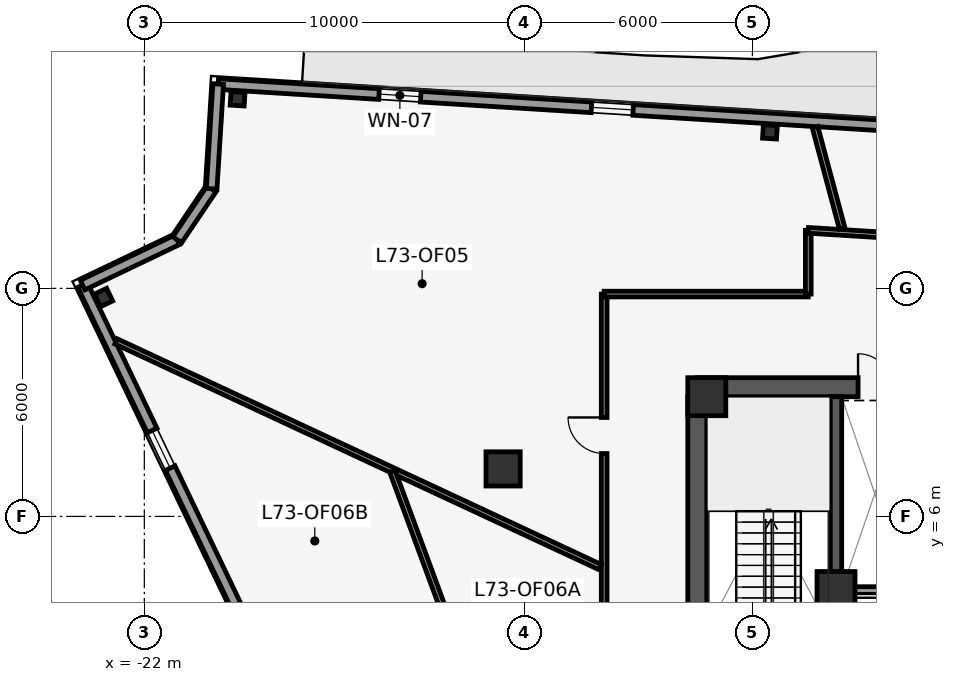
"""IFC4 building model, lengths in metres.
Left out: names, types, materials, properties, quantities, classifications, styles, units other than length and angle.
Written with IfcOpenShell. Run it as: python <this file> out.ifc"""

import sys

from ifc_helpers import new_model, si_unit, direction, frame, frame_2d, origin, origin_2d, place, context, subcontext, project, spatial, rectangle, i_section, extrude, element, fill, save


model = new_model("IFC4")
c1 = context("Model", 3, precision=1e-05, world=origin(), true_north=direction((0.0, 1.0)))
c2 = subcontext(c1, "Body", "Model", "MODEL_VIEW")
j1 = project(units=[si_unit("LENGTHUNIT", "METRE"), si_unit("PLANEANGLEUNIT", "RADIAN")], contexts=[c1])
p1 = place(None, origin())
s1 = spatial("IfcSite", under=j1, at=p1, CompositionType="ELEMENT")
p2 = place(p1, origin())
s2 = spatial("IfcBuilding", under=s1, at=p2, CompositionType="ELEMENT")
p3 = place(p2, frame((0.0, 0.0, 310.6)))
s3 = spatial("IfcBuildingStorey", under=s2, at=p3, CompositionType="ELEMENT", Elevation=310.6)
p4 = place(p3, frame((-7.45, 9.4, 0.0), z_axis=(0.0, 0.0, 1.0), x_axis=(1.0, 0.0, 0.0)))
e1 = element("IfcWall", 1, at=p4, inside=s3, PredefinedType="SHEAR", context=c2, shape_type="SweptSolid", body=[
    extrude(rectangle(XDim=14.9, YDim=0.5, at=frame_2d((7.45, 0.0))), origin(), (0.0, 0.0, 1.0), 3.85),
])
p5 = place(p4, frame((6.9, 0.0, 0.0)))
e2 = element("IfcOpeningElement", 2, at=p5, cuts=e1, PredefinedType="OPENING", context=c2, shape_type="SweptSolid", body=[
    extrude(rectangle(XDim=1.1, YDim=2.15, at=frame_2d((0.55, 1.075))), frame((0.0, 0.26, 0.0), z_axis=(0.0, -1.0, 0.0), x_axis=(1.0, 0.0, 0.0)), (0.0, 0.0, 1.0), 0.52),
])
p6 = place(p4, frame((4.23, 0.0, 0.0)))
e3 = element("IfcOpeningElement", 3, at=p6, cuts=e1, PredefinedType="OPENING", context=c2, shape_type="SweptSolid", body=[
    extrude(rectangle(XDim=0.88, YDim=2.15, at=frame_2d((0.44, 1.075))), frame((0.0, 0.26, 0.0), z_axis=(0.0, -1.0, 0.0), x_axis=(1.0, 0.0, 0.0)), (0.0, 0.0, 1.0), 0.52),
])
p7 = place(p4, frame((9.79, 0.0, 0.0)))
e4 = element("IfcOpeningElement", 4, at=p7, cuts=e1, PredefinedType="OPENING", context=c2, shape_type="SweptSolid", body=[
    extrude(rectangle(XDim=0.88, YDim=2.15, at=frame_2d((0.44, 1.075))), frame((0.0, 0.26, 0.0), z_axis=(0.0, -1.0, 0.0), x_axis=(1.0, 0.0, 0.0)), (0.0, 0.0, 1.0), 0.52),
])
p8 = place(p3, frame((-3.8, 1.45, 0.0), z_axis=(0.0, 0.0, 1.0), x_axis=(0.0, 1.0, 0.0)))
e5 = element("IfcWall", 5, at=p8, inside=s3, PredefinedType="SHEAR", context=c2, shape_type="SweptSolid", body=[
    extrude(rectangle(XDim=7.7, YDim=0.3, at=frame_2d((3.85, 0.0))), origin(), (0.0, 0.0, 1.0), 3.85),
])
p9 = place(p3, frame((-7.45, 0.1, 0.0), z_axis=(0.0, 0.0, 1.0), x_axis=(0.0, 1.0, 0.0)))
e6 = element("IfcWall", 6, at=p9, inside=s3, PredefinedType="SHEAR", context=c2, shape_type="SweptSolid", body=[
    extrude(rectangle(XDim=9.05, YDim=0.5, at=frame_2d((4.525, 0.0))), origin(), (0.0, 0.0, 1.0), 3.85),
])
for number, where, z_axis, x_axis in (
    (7, (-7.2, 9.15, 0.0), (0.0, 0.0, 1.0), (1.0, 0.0, 0.0)),
    (8, (-3.8, 4.05, 0.0), (0.0, 0.0, 1.0), (1.0, 0.0, 0.0)),
):
    element("IfcColumn", number, at=place(p3, frame(where, z_axis=z_axis, x_axis=x_axis)), inside=s3, PredefinedType="COLUMN", context=c2, shape_type="SweptSolid", body=[
        extrude(rectangle(XDim=1.0, YDim=1.0, at=origin_2d()), origin(), (0.0, 0.0, 1.0), 4.1),
    ])
p10 = place(p3, frame((-12.56, 7.25, 0.0), z_axis=(0.0, 0.0, 1.0), x_axis=(1.0, 0.0, 0.0)))
e9 = element("IfcColumn", 9, at=p10, inside=s3, PredefinedType="COLUMN", context=c2, shape_type="SweptSolid", body=[
    extrude(rectangle(XDim=0.9, YDim=0.9, at=origin_2d()), origin(), (0.0, 0.0, 1.0), 4.1),
])
for number, where, z_axis, x_axis in (
    (10, (-23.073, 11.759, 0.0), (0.0, 0.0, 1.0), (-0.431, 0.902, 0.0)),
    (11, (-5.538, 16.118, 0.0), (0.0, 0.0, 1.0), (-0.998, 0.062, 0.0)),
    (12, (-19.546, 16.988, 0.0), (0.0, 0.0, 1.0), (-0.998, 0.062, 0.0)),
):
    element("IfcColumn", number, at=place(p3, frame(where, z_axis=z_axis, x_axis=x_axis)), inside=s3, PredefinedType="COLUMN", context=c2, shape_type="SweptSolid", body=[
        extrude(i_section(OverallWidth=0.368, OverallDepth=0.356, WebThickness=0.011, FlangeThickness=0.018, at=origin_2d()), origin(), (0.0, 0.0, 1.0), 4.1),
    ])
p11 = place(p3, frame((-20.056, 17.376, 0.0), z_axis=(0.0, 0.0, 1.0), x_axis=(0.998061236898, -0.06223959674, 0.0)))
e13 = element("IfcWall", 13, at=p11, inside=s3, PredefinedType="STANDARD", context=c2, shape_type="SweptSolid", body=[
    extrude(rectangle(XDim=43.18, YDim=0.28, at=frame_2d((21.59, 0.0))), origin(), (0.0, 0.0, 1.0), 3.85),
])
p12 = place(p11, frame((23.681, 0.0, 0.0)))
e14 = element("IfcOpeningElement", 14, at=p12, cuts=e13, PredefinedType="OPENING", context=c2, shape_type="SweptSolid", body=[
    extrude(rectangle(XDim=1.0, YDim=2.15, at=frame_2d((0.5, 1.075))), frame((0.0, 0.15, 0.0), z_axis=(0.0, -1.0, 0.0), x_axis=(1.0, 0.0, 0.0)), (0.0, 0.0, 1.0), 0.3),
])
p13 = place(p11, frame((4.24, 0.0, 0.85)))
e15 = element("IfcOpeningElement", 15, at=p13, cuts=e13, PredefinedType="OPENING", context=c2, shape_type="SweptSolid", body=[
    extrude(rectangle(XDim=1.1, YDim=2.15, at=frame_2d((0.55, 1.075))), frame((0.0, 0.15, 0.0), z_axis=(0.0, -1.0, 0.0), x_axis=(1.0, 0.0, 0.0)), (0.0, 0.0, 1.0), 0.3),
])
p14 = place(p11, frame((9.84, 0.0, 0.85)))
e16 = element("IfcOpeningElement", 16, at=p14, cuts=e13, PredefinedType="OPENING", context=c2, shape_type="SweptSolid", body=[
    extrude(rectangle(XDim=1.1, YDim=2.15, at=frame_2d((0.55, 1.075))), frame((0.0, 0.15, 0.0), z_axis=(0.0, -1.0, 0.0), x_axis=(1.0, 0.0, 0.0)), (0.0, 0.0, 1.0), 0.3),
])
p15 = place(p11, frame((21.04, 0.0, 0.85)))
e17 = element("IfcOpeningElement", 17, at=p15, cuts=e13, PredefinedType="OPENING", context=c2, shape_type="SweptSolid", body=[
    extrude(rectangle(XDim=1.1, YDim=2.15, at=frame_2d((0.55, 1.075))), frame((0.0, 0.15, 0.0), z_axis=(0.0, -1.0, 0.0), x_axis=(1.0, 0.0, 0.0)), (0.0, 0.0, 1.0), 0.3),
])
p16 = place(p11, frame((32.24, 0.0, 0.85)))
e18 = element("IfcOpeningElement", 18, at=p16, cuts=e13, PredefinedType="OPENING", context=c2, shape_type="SweptSolid", body=[
    extrude(rectangle(XDim=1.1, YDim=2.15, at=frame_2d((0.55, 1.075))), frame((0.0, 0.15, 0.0), z_axis=(0.0, -1.0, 0.0), x_axis=(1.0, 0.0, 0.0)), (0.0, 0.0, 1.0), 0.3),
])
p17 = place(p11, frame((37.84, 0.0, 0.85)))
e19 = element("IfcOpeningElement", 19, at=p17, cuts=e13, PredefinedType="OPENING", context=c2, shape_type="SweptSolid", body=[
    extrude(rectangle(XDim=1.1, YDim=2.15, at=frame_2d((0.55, 1.075))), frame((0.0, 0.15, 0.0), z_axis=(0.0, -1.0, 0.0), x_axis=(1.0, 0.0, 0.0)), (0.0, 0.0, 1.0), 0.3),
])
p18 = place(p3, frame((-4.988, -26.865, 0.0), z_axis=(0.0, 0.0, 1.0), x_axis=(-0.431592936847, 0.902068476815, 0.0)))
e20 = element("IfcWall", 20, at=p18, inside=s3, PredefinedType="STANDARD", context=c2, shape_type="SweptSolid", body=[
    extrude(rectangle(XDim=43.18, YDim=0.28, at=frame_2d((21.59, 0.0))), origin(), (0.0, 0.0, 1.0), 3.85),
])
p19 = place(p18, frame((4.24, 0.0, 0.85)))
e21 = element("IfcOpeningElement", 21, at=p19, cuts=e20, PredefinedType="OPENING", context=c2, shape_type="SweptSolid", body=[
    extrude(rectangle(XDim=1.1, YDim=2.15, at=frame_2d((0.55, 1.075))), frame((0.0, 0.15, 0.0), z_axis=(0.0, -1.0, 0.0), x_axis=(1.0, 0.0, 0.0)), (0.0, 0.0, 1.0), 0.3),
])
p20 = place(p18, frame((9.84, 0.0, 0.85)))
e22 = element("IfcOpeningElement", 22, at=p20, cuts=e20, PredefinedType="OPENING", context=c2, shape_type="SweptSolid", body=[
    extrude(rectangle(XDim=1.1, YDim=2.15, at=frame_2d((0.55, 1.075))), frame((0.0, 0.15, 0.0), z_axis=(0.0, -1.0, 0.0), x_axis=(1.0, 0.0, 0.0)), (0.0, 0.0, 1.0), 0.3),
])
p21 = place(p18, frame((32.24, 0.0, 0.85)))
e23 = element("IfcOpeningElement", 23, at=p21, cuts=e20, PredefinedType="OPENING", context=c2, shape_type="SweptSolid", body=[
    extrude(rectangle(XDim=1.1, YDim=2.15, at=frame_2d((0.55, 1.075))), frame((0.0, 0.15, 0.0), z_axis=(0.0, -1.0, 0.0), x_axis=(1.0, 0.0, 0.0)), (0.0, 0.0, 1.0), 0.3),
])
p22 = place(p18, frame((37.84, 0.0, 0.85)))
e24 = element("IfcOpeningElement", 24, at=p22, cuts=e20, PredefinedType="OPENING", context=c2, shape_type="SweptSolid", body=[
    extrude(rectangle(XDim=1.1, YDim=2.15, at=frame_2d((0.55, 1.075))), frame((0.0, 0.15, 0.0), z_axis=(0.0, -1.0, 0.0), x_axis=(1.0, 0.0, 0.0)), (0.0, 0.0, 1.0), 0.3),
])
p23 = place(p3, frame((-23.625, 12.087, 0.0), z_axis=(0.0, 0.0, 1.0), x_axis=(0.902092306117, 0.431543127909, 0.0)))
e25 = element("IfcWall", 25, at=p23, inside=s3, PredefinedType="STANDARD", context=c2, shape_type="SweptSolid", body=[
    extrude(rectangle(XDim=2.76, YDim=0.28, at=frame_2d((1.38, 0.0))), origin(), (0.0, 0.0, 1.0), 3.85),
])
p24 = place(p3, frame((-21.135, 13.278, 0.0), z_axis=(0.0, 0.0, 1.0), x_axis=(0.559107950815, 0.829094867512, 0.0)))
e26 = element("IfcWall", 26, at=p24, inside=s3, PredefinedType="STANDARD", context=c2, shape_type="SweptSolid", body=[
    extrude(rectangle(XDim=1.62, YDim=0.28, at=frame_2d((0.81, 0.0))), origin(), (0.0, 0.0, 1.0), 3.85),
])
p25 = place(p3, frame((-20.229, 14.622, 0.0), z_axis=(0.0, 0.0, 1.0), x_axis=(0.062361765106, 0.998053610911, 0.0)))
e27 = element("IfcWall", 27, at=p25, inside=s3, PredefinedType="STANDARD", context=c2, shape_type="SweptSolid", body=[
    extrude(rectangle(XDim=2.76, YDim=0.28, at=frame_2d((1.38, 0.0))), origin(), (0.0, 0.0, 1.0), 3.85),
])
p26 = place(p3, frame((-3.65, 4.05, 0.0), z_axis=(0.0, 0.0, 1.0), x_axis=(1.0, 0.0, 0.0)))
e28 = element("IfcWall", 28, at=p26, inside=s3, PredefinedType="PARTITIONING", context=c2, shape_type="SweptSolid", body=[
    extrude(rectangle(XDim=1.73, YDim=0.2, at=frame_2d((0.865, 0.0))), origin(), (0.0, 0.0, 1.0), 3.85),
])
p27 = place(p3, frame((-9.9, -9.937, 0.0), z_axis=(0.0, 0.0, 1.0), x_axis=(0.0, 1.0, 0.0)))
e29 = element("IfcWall", 29, at=p27, inside=s3, PredefinedType="PARTITIONING", context=c2, shape_type="SweptSolid", body=[
    extrude(rectangle(XDim=21.787, YDim=0.15, at=frame_2d((10.894, 0.0))), origin(), (0.0, 0.0, 1.0), 3.85),
])
p28 = place(p27, frame((17.591, 0.0, 0.0)))
e30 = element("IfcOpeningElement", 30, at=p28, cuts=e29, PredefinedType="OPENING", context=c2, shape_type="SweptSolid", body=[
    extrude(rectangle(XDim=0.95, YDim=2.15, at=frame_2d((0.475, 1.075))), frame((0.0, 0.085, 0.0), z_axis=(0.0, -1.0, 0.0), x_axis=(1.0, 0.0, 0.0)), (0.0, 0.0, 1.0), 0.17),
])
p29 = place(p27, frame((9.022, 0.0, 0.0)))
e31 = element("IfcOpeningElement", 31, at=p29, cuts=e29, PredefinedType="OPENING", context=c2, shape_type="SweptSolid", body=[
    extrude(rectangle(XDim=0.95, YDim=2.15, at=frame_2d((0.475, 1.075))), frame((0.0, 0.085, 0.0), z_axis=(0.0, -1.0, 0.0), x_axis=(1.0, 0.0, 0.0)), (0.0, 0.0, 1.0), 0.17),
])
p30 = place(p3, frame((-9.9, 11.85, 0.0), z_axis=(0.0, 0.0, 1.0), x_axis=(1.0, 0.0, 0.0)))
e32 = element("IfcWall", 32, at=p30, inside=s3, PredefinedType="PARTITIONING", context=c2, shape_type="SweptSolid", body=[
    extrude(rectangle(XDim=5.37, YDim=0.15, at=frame_2d((2.685, 0.0))), origin(), (0.0, 0.0, 1.0), 3.85),
])
p31 = place(p3, frame((-4.53, 11.85, 0.0), z_axis=(0.0, 0.0, 1.0), x_axis=(0.0, 1.0, 0.0)))
e33 = element("IfcWall", 33, at=p31, inside=s3, PredefinedType="PARTITIONING", context=c2, shape_type="SweptSolid", body=[
    extrude(rectangle(XDim=1.677, YDim=0.15, at=frame_2d((0.839, 0.0))), origin(), (0.0, 0.0, 1.0), 3.85),
])
p32 = place(p3, frame((-4.53, 13.527, 0.0), z_axis=(0.0, 0.0, 1.0), x_axis=(0.998061597532, -0.062233813416, 0.0)))
e34 = element("IfcWall", 34, at=p32, inside=s3, PredefinedType="PARTITIONING", context=c2, shape_type="SweptSolid", body=[
    extrude(rectangle(XDim=2.314, YDim=0.15, at=frame_2d((1.157, 0.0))), origin(), (0.0, 0.0, 1.0), 3.85),
])
p33 = place(p3, frame((-3.638, 13.577, 0.0), z_axis=(0.0, 0.0, 1.0), x_axis=(-0.258764100705, 0.965940546921, 0.0)))
e35 = element("IfcWall", 35, at=p33, inside=s3, PredefinedType="PARTITIONING", context=c2, shape_type="SweptSolid", body=[
    extrude(rectangle(XDim=2.759, YDim=0.15, at=frame_2d((1.379, 0.0))), origin(), (0.0, 0.0, 1.0), 3.85),
])
p34 = place(p3, frame((-10.005, 4.665, 0.0), z_axis=(0.0, 0.0, 1.0), x_axis=(-0.906304243042, 0.422625861778, 0.0)))
e36 = element("IfcWall", 36, at=p34, inside=s3, PredefinedType="PARTITIONING", context=c2, shape_type="SweptSolid", body=[
    extrude(rectangle(XDim=14.056, YDim=0.15, at=frame_2d((7.028, 0.0))), origin(), (0.0, 0.0, 1.0), 3.85),
])
p35 = place(p3, frame((-15.473, 7.188, 0.0), z_axis=(0.0, 0.0, 1.0), x_axis=(0.346159492737, -0.938175679491, 0.0)))
e37 = element("IfcWall", 37, at=p35, inside=s3, PredefinedType="PARTITIONING", context=c2, shape_type="SweptSolid", body=[
    extrude(rectangle(XDim=13.925, YDim=0.15, at=frame_2d((6.962, 0.0))), origin(), (0.0, 0.0, 1.0), 3.85),
])
p36 = place(p35, frame((6.512, 0.0, 0.0)))
e38 = element("IfcOpeningElement", 38, at=p36, cuts=e37, PredefinedType="OPENING", context=c2, shape_type="SweptSolid", body=[
    extrude(rectangle(XDim=0.9, YDim=2.1, at=frame_2d((0.45, 1.05))), frame((0.0, 0.085, 0.0), z_axis=(0.0, -1.0, 0.0), x_axis=(1.0, 0.0, 0.0)), (0.0, 0.0, 1.0), 0.17),
])
p37 = place(p13, origin())
e39 = element("IfcWindow", 39, at=p37, inside=s3, PartitioningType="SINGLE_PANEL", PredefinedType="WINDOW", context=c2, shape_type="SweptSolid", body=[
    extrude(rectangle(XDim=1.1, YDim=2.15, at=frame_2d((0.55, 1.075))), frame((0.0, 0.03, 0.0), z_axis=(0.0, -1.0, 0.0), x_axis=(1.0, 0.0, 0.0)), (0.0, 0.0, 1.0), 0.06),
])
fill(e15, e39)
p38 = place(p14, origin())
e40 = element("IfcWindow", 40, at=p38, inside=s3, PartitioningType="SINGLE_PANEL", PredefinedType="WINDOW", context=c2, shape_type="SweptSolid", body=[
    extrude(rectangle(XDim=1.1, YDim=2.15, at=frame_2d((0.55, 1.075))), frame((0.0, 0.03, 0.0), z_axis=(0.0, -1.0, 0.0), x_axis=(1.0, 0.0, 0.0)), (0.0, 0.0, 1.0), 0.06),
])
fill(e16, e40)
p39 = place(p22, origin())
e41 = element("IfcWindow", 41, at=p39, inside=s3, PartitioningType="SINGLE_PANEL", PredefinedType="WINDOW", context=c2, shape_type="SweptSolid", body=[
    extrude(rectangle(XDim=1.1, YDim=2.15, at=frame_2d((0.55, 1.075))), frame((0.0, 0.03, 0.0), z_axis=(0.0, -1.0, 0.0), x_axis=(1.0, 0.0, 0.0)), (0.0, 0.0, 1.0), 0.06),
])
fill(e24, e41)
p40 = place(p6, origin())
e42 = element("IfcDoor", 42, at=p40, inside=s3, OperationType="SINGLE_SWING_LEFT", PredefinedType="DOOR", context=c2, shape_type="SweptSolid", body=[
    extrude(rectangle(XDim=0.88, YDim=2.15, at=frame_2d((0.44, 1.075))), frame((0.0, 0.025, 0.0), z_axis=(0.0, -1.0, 0.0), x_axis=(1.0, 0.0, 0.0)), (0.0, 0.0, 1.0), 0.05),
])
fill(e3, e42)
p41 = place(p28, origin())
e43 = element("IfcDoor", 43, at=p41, inside=s3, OperationType="SINGLE_SWING_RIGHT", PredefinedType="DOOR", context=c2, shape_type="SweptSolid", body=[
    extrude(rectangle(XDim=0.95, YDim=2.15, at=frame_2d((0.475, 1.075))), frame((0.0, 0.025, 0.0), z_axis=(0.0, -1.0, 0.0), x_axis=(1.0, 0.0, 0.0)), (0.0, 0.0, 1.0), 0.05),
])
fill(e30, e43)
save(model, sys.argv[1])
